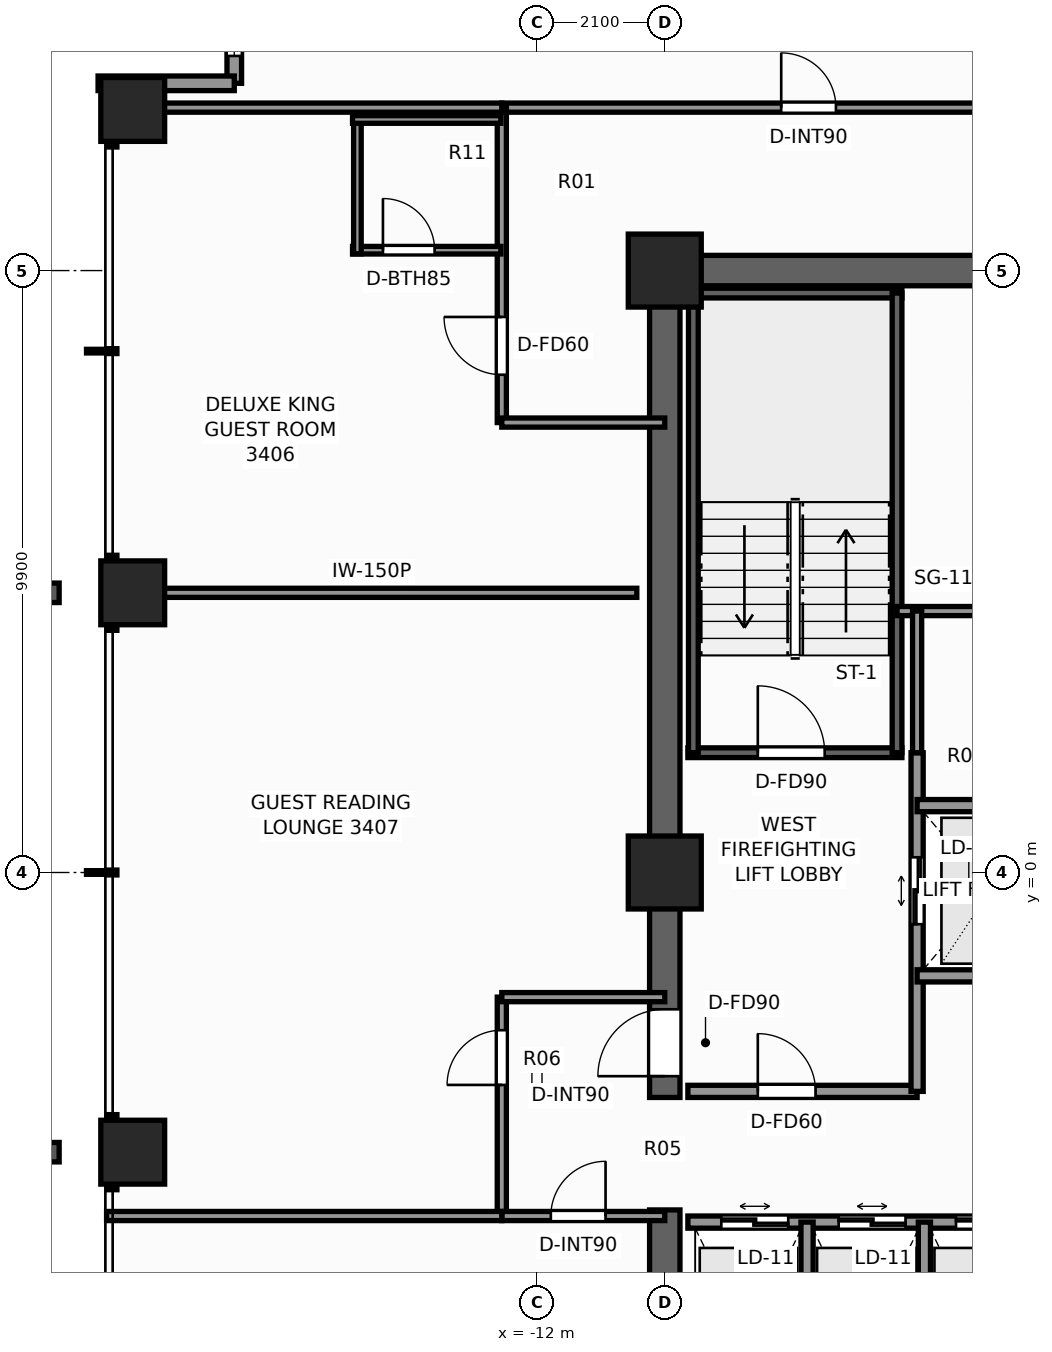
"""IFC4 building model, lengths in metres.
Left out: names, types, materials, properties, quantities, classifications, styles, units other than length and angle.
Written with IfcOpenShell. Run it as: python <this file> out.ifc"""

import sys

from ifc_helpers import new_model, si_unit, direction, frame, frame_2d, origin, origin_2d, place, context, subcontext, project, spatial, rectangle, extrude, element, fill, save


model = new_model("IFC4")
c1 = context("Model", 3, precision=1e-05, world=origin(), true_north=direction((0.0, 1.0)))
c2 = subcontext(c1, "Body", "Model", "MODEL_VIEW")
j1 = project(units=[si_unit("LENGTHUNIT", "METRE"), si_unit("PLANEANGLEUNIT", "RADIAN")], contexts=[c1])
p1 = place(None, origin())
s1 = spatial("IfcSite", under=j1, at=p1, CompositionType="ELEMENT")
p2 = place(p1, origin())
s2 = spatial("IfcBuilding", under=s1, at=p2, CompositionType="ELEMENT")
p3 = place(p2, frame((0.0, 0.0, 118.4)))
s3 = spatial("IfcBuildingStorey", under=s2, at=p3, CompositionType="ELEMENT", Elevation=118.4)
p4 = place(p3, frame((-10.15, 9.9, 0.0), z_axis=(0.0, 0.0, 1.0), x_axis=(1.0, 0.0, 0.0)))
e1 = element("IfcWall", 1, at=p4, inside=s3, PredefinedType="SHEAR", context=c2, shape_type="SweptSolid", body=[
    extrude(rectangle(XDim=14.57, YDim=0.5, at=frame_2d((7.285, 0.0))), origin(), (0.0, 0.0, 1.0), 3.3),
])
p5 = place(p3, frame((-9.9, -9.65, 0.0), z_axis=(0.0, 0.0, 1.0), x_axis=(0.0, 1.0, 0.0)))
e2 = element("IfcWall", 2, at=p5, inside=s3, PredefinedType="SHEAR", context=c2, shape_type="SweptSolid", body=[
    extrude(rectangle(XDim=4.1, YDim=0.5, at=frame_2d((2.05, 0.0))), origin(), (0.0, 0.0, 1.0), 3.3),
])
p6 = place(p3, frame((-9.9, -3.7, 0.0), z_axis=(0.0, 0.0, 1.0), x_axis=(0.0, 1.0, 0.0)))
e3 = element("IfcWall", 3, at=p6, inside=s3, PredefinedType="SHEAR", context=c2, shape_type="SweptSolid", body=[
    extrude(rectangle(XDim=13.35, YDim=0.5, at=frame_2d((6.675, 0.0))), origin(), (0.0, 0.0, 1.0), 3.3),
])
p7 = place(p6, frame((0.35, 0.0, 0.0)))
e4 = element("IfcOpeningElement", 4, at=p7, cuts=e3, PredefinedType="OPENING", context=c2, shape_type="SweptSolid", body=[
    extrude(rectangle(XDim=1.1, YDim=2.2, at=frame_2d((0.55, 1.1))), frame((0.0, 0.26, 0.0), z_axis=(0.0, -1.0, 0.0), x_axis=(1.0, 0.0, 0.0)), (0.0, 0.0, 1.0), 0.52),
])
for number, where, z_axis, x_axis in (
    (5, (-9.9, 9.9, 0.0), (0.0, 0.0, 1.0), (1.0, 0.0, 0.0)),
    (6, (-9.9, 0.0, 0.0), (0.0, 0.0, 1.0), (1.0, 0.0, 0.0)),
):
    element("IfcColumn", number, at=place(p3, frame(where, z_axis=z_axis, x_axis=x_axis)), inside=s3, PredefinedType="COLUMN", context=c2, shape_type="SweptSolid", body=[
        extrude(rectangle(XDim=1.2, YDim=1.2, at=origin_2d()), origin(), (0.0, 0.0, 1.0), 3.3),
    ])
for number, where, z_axis, x_axis in (
    (7, (-18.65, -4.6, 0.0), (0.0, 0.0, 1.0), (1.0, 0.0, 0.0)),
    (8, (-18.65, 4.6, 0.0), (0.0, 0.0, 1.0), (1.0, 0.0, 0.0)),
    (9, (-18.65, 12.55, 0.0), (0.0, 0.0, 1.0), (1.0, 0.0, 0.0)),
):
    element("IfcColumn", number, at=place(p3, frame(where, z_axis=z_axis, x_axis=x_axis)), inside=s3, PredefinedType="COLUMN", context=c2, shape_type="SweptSolid", body=[
        extrude(rectangle(XDim=1.05, YDim=1.05, at=origin_2d()), origin(), (0.0, 0.0, 1.0), 3.3),
    ])
p8 = place(p3, frame((-16.98, 12.98, 0.0), z_axis=(0.0, 0.0, 1.0), x_axis=(0.0, 1.0, 0.0)))
e10 = element("IfcWall", 10, at=p8, inside=s3, PredefinedType="STANDARD", context=c2, shape_type="SweptSolid", body=[
    extrude(rectangle(XDim=2.24, YDim=0.24, at=frame_2d((1.12, 0.0))), origin(), (0.0, 0.0, 1.0), 2.459),
])
p9 = place(p8, frame((0.45, 0.0, 0.65)))
e11 = element("IfcOpeningElement", 11, at=p9, cuts=e10, PredefinedType="OPENING", context=c2, shape_type="SweptSolid", body=[
    extrude(rectangle(XDim=1.1, YDim=1.45, at=frame_2d((0.55, 0.725))), frame((0.0, 0.13, 0.0), z_axis=(0.0, -1.0, 0.0), x_axis=(1.0, 0.0, 0.0)), (0.0, 0.0, 1.0), 0.26),
])
p10 = place(p3, frame((-19.22, 12.98, 0.0), z_axis=(0.0, 0.0, 1.0), x_axis=(1.0, 0.0, 0.0)))
e12 = element("IfcWall", 12, at=p10, inside=s3, PredefinedType="STANDARD", context=c2, shape_type="SweptSolid", body=[
    extrude(rectangle(XDim=2.24, YDim=0.24, at=frame_2d((1.12, 0.0))), origin(), (0.0, 0.0, 1.0), 2.459),
])
p11 = place(p3, frame((-9.52, 1.97, 0.0), z_axis=(0.0, 0.0, 1.0), x_axis=(1.0, 0.0, 0.0)))
e13 = element("IfcWall", 13, at=p11, inside=s3, PredefinedType="SHEAR", context=c2, shape_type="SweptSolid", body=[
    extrude(rectangle(XDim=3.52, YDim=0.16, at=frame_2d((1.76, 0.0))), origin(), (0.0, 0.0, 1.0), 3.3),
])
p12 = place(p11, frame((1.15, 0.0, 0.0)))
e14 = element("IfcOpeningElement", 14, at=p12, cuts=e13, PredefinedType="OPENING", context=c2, shape_type="SweptSolid", body=[
    extrude(rectangle(XDim=1.1, YDim=2.2, at=frame_2d((0.55, 1.1))), frame((0.0, 0.09, 0.0), z_axis=(0.0, -1.0, 0.0), x_axis=(1.0, 0.0, 0.0)), (0.0, 0.0, 1.0), 0.18),
])
p13 = place(p3, frame((-9.52, 9.53, 0.0), z_axis=(0.0, 0.0, 1.0), x_axis=(1.0, 0.0, 0.0)))
e15 = element("IfcWall", 15, at=p13, inside=s3, PredefinedType="SHEAR", context=c2, shape_type="SweptSolid", body=[
    extrude(rectangle(XDim=3.52, YDim=0.16, at=frame_2d((1.76, 0.0))), origin(), (0.0, 0.0, 1.0), 3.3),
])
for number, where, z_axis, x_axis in (
    (16, (-9.43, 1.97, 0.0), (0.0, 0.0, 1.0), (0.0, 1.0, 0.0)),
    (17, (-6.08, 1.97, 0.0), (0.0, 0.0, 1.0), (0.0, 1.0, 0.0)),
):
    element("IfcWall", number, at=place(p3, frame(where, z_axis=z_axis, x_axis=x_axis)), inside=s3, PredefinedType="SHEAR", context=c2, shape_type="SweptSolid", body=[
        extrude(rectangle(XDim=7.56, YDim=0.16, at=frame_2d((3.78, 0.0))), origin(), (0.0, 0.0, 1.0), 3.3),
    ])
p14 = place(p3, frame((-9.52, -3.6, 0.0), z_axis=(0.0, 0.0, 1.0), x_axis=(1.0, 0.0, 0.0)))
e18 = element("IfcWall", 18, at=p14, inside=s3, PredefinedType="SOLIDWALL", context=c2, shape_type="SweptSolid", body=[
    extrude(rectangle(XDim=3.77, YDim=0.2, at=frame_2d((1.885, 0.0))), origin(), (0.0, 0.0, 1.0), 3.08),
])
p15 = place(p14, frame((1.15, 0.0, 0.0)))
e19 = element("IfcOpeningElement", 19, at=p15, cuts=e18, PredefinedType="OPENING", context=c2, shape_type="SweptSolid", body=[
    extrude(rectangle(XDim=0.95, YDim=2.06, at=frame_2d((0.475, 1.03))), frame((0.0, 0.11, 0.0), z_axis=(0.0, -1.0, 0.0), x_axis=(1.0, 0.0, 0.0)), (0.0, 0.0, 1.0), 0.22),
])
p16 = place(p3, frame((-5.75, -3.6, 0.0), z_axis=(0.0, 0.0, 1.0), x_axis=(0.0, 1.0, 0.0)))
e20 = element("IfcWall", 20, at=p16, inside=s3, PredefinedType="SOLIDWALL", context=c2, shape_type="SweptSolid", body=[
    extrude(rectangle(XDim=5.57, YDim=0.2, at=frame_2d((2.785, 0.0))), origin(), (0.0, 0.0, 1.0), 2.715),
])
p17 = place(p16, frame((2.75, 0.0, 0.0)))
e21 = element("IfcOpeningElement", 21, at=p17, cuts=e20, PredefinedType="OPENING", context=c2, shape_type="SweptSolid", body=[
    extrude(rectangle(XDim=1.1, YDim=2.2, at=frame_2d((0.55, 1.1))), frame((0.0, 0.11, 0.0), z_axis=(0.0, -1.0, 0.0), x_axis=(1.0, 0.0, 0.0)), (0.0, 0.0, 1.0), 0.22),
])
for number, where, z_axis, x_axis in (
    (22, (-5.75, -1.7, 0.0), (0.0, 0.0, 1.0), (1.0, 0.0, 0.0)),
    (23, (-5.75, 1.1, 0.0), (0.0, 0.0, 1.0), (1.0, 0.0, 0.0)),
):
    element("IfcWall", number, at=place(p3, frame(where, z_axis=z_axis, x_axis=x_axis)), inside=s3, PredefinedType="SOLIDWALL", context=c2, shape_type="SweptSolid", body=[
        extrude(rectangle(XDim=2.4, YDim=0.2, at=frame_2d((1.2, 0.0))), origin(), (0.0, 0.0, 1.0), 3.08),
    ])
p18 = place(p3, frame((-6.08, 4.3, 0.0), z_axis=(0.0, 0.0, 1.0), x_axis=(1.0, 0.0, 0.0)))
e24 = element("IfcWall", 24, at=p18, inside=s3, PredefinedType="PARTITIONING", context=c2, shape_type="SweptSolid", body=[
    extrude(rectangle(XDim=6.3, YDim=0.15, at=frame_2d((3.15, 0.0))), origin(), (0.0, 0.0, 1.0), 3.08),
])
p19 = place(p3, frame((-9.52, -5.75, 0.0), z_axis=(0.0, 0.0, 1.0), x_axis=(1.0, 0.0, 0.0)))
e25 = element("IfcWall", 25, at=p19, inside=s3, PredefinedType="SOLIDWALL", context=c2, shape_type="SweptSolid", body=[
    extrude(rectangle(XDim=5.66, YDim=0.2, at=frame_2d((2.83, 0.0))), origin(), (0.0, 0.0, 1.0), 3.08),
])
p20 = place(p19, frame((0.55, 0.0, 0.0)))
e26 = element("IfcOpeningElement", 26, at=p20, cuts=e25, PredefinedType="OPENING", context=c2, shape_type="SweptSolid", body=[
    extrude(rectangle(XDim=1.1, YDim=2.2, at=frame_2d((0.55, 1.1))), frame((0.0, 0.11, 0.0), z_axis=(0.0, -1.0, 0.0), x_axis=(1.0, 0.0, 0.0)), (0.0, 0.0, 1.0), 0.22),
])
p21 = place(p19, frame((2.48, 0.0, 0.0)))
e27 = element("IfcOpeningElement", 27, at=p21, cuts=e25, PredefinedType="OPENING", context=c2, shape_type="SweptSolid", body=[
    extrude(rectangle(XDim=1.1, YDim=2.2, at=frame_2d((0.55, 1.1))), frame((0.0, 0.11, 0.0), z_axis=(0.0, -1.0, 0.0), x_axis=(1.0, 0.0, 0.0)), (0.0, 0.0, 1.0), 0.22),
])
p22 = place(p19, frame((4.41, 0.0, 0.0)))
e28 = element("IfcOpeningElement", 28, at=p22, cuts=e25, PredefinedType="OPENING", context=c2, shape_type="SweptSolid", body=[
    extrude(rectangle(XDim=1.1, YDim=2.2, at=frame_2d((0.55, 1.1))), frame((0.0, 0.11, 0.0), z_axis=(0.0, -1.0, 0.0), x_axis=(1.0, 0.0, 0.0)), (0.0, 0.0, 1.0), 0.22),
])
for number, where, z_axis, x_axis in (
    (29, (-7.56, -9.52, 0.0), (0.0, 0.0, 1.0), (0.0, 1.0, 0.0)),
    (30, (-5.63, -9.52, 0.0), (0.0, 0.0, 1.0), (0.0, 1.0, 0.0)),
):
    element("IfcWall", number, at=place(p3, frame(where, z_axis=z_axis, x_axis=x_axis)), inside=s3, PredefinedType="SOLIDWALL", context=c2, shape_type="SweptSolid", body=[
        extrude(rectangle(XDim=3.77, YDim=0.2, at=frame_2d((1.885, 0.0))), origin(), (0.0, 0.0, 1.0), 3.08),
    ])
p23 = place(p3, frame((-5.75, 1.97, 0.0), z_axis=(0.0, 0.0, 1.0), x_axis=(0.0, 1.0, 0.0)))
e31 = element("IfcWall", 31, at=p23, inside=s3, PredefinedType="PARTITIONING", context=c2, shape_type="SweptSolid", body=[
    extrude(rectangle(XDim=2.33, YDim=0.15, at=frame_2d((1.165, 0.0))), origin(), (0.0, 0.0, 1.0), 2.715),
])
p24 = place(p3, frame((-12.58, 12.58, 0.0), z_axis=(0.0, 0.0, 1.0), x_axis=(1.0, 0.0, 0.0)))
e32 = element("IfcWall", 32, at=p24, inside=s3, PredefinedType="PARTITIONING", context=c2, shape_type="SweptSolid", body=[
    extrude(rectangle(XDim=24.84, YDim=0.15, at=frame_2d((12.42, 0.0))), origin(), (0.0, 0.0, 1.0), 2.292),
])
p25 = place(p24, frame((4.595, 0.0, 0.0)))
e33 = element("IfcOpeningElement", 33, at=p25, cuts=e32, PredefinedType="OPENING", context=c2, shape_type="SweptSolid", body=[
    extrude(rectangle(XDim=0.9, YDim=2.06, at=frame_2d((0.45, 1.03))), frame((0.0, 0.085, 0.0), z_axis=(0.0, -1.0, 0.0), x_axis=(1.0, 0.0, 0.0)), (0.0, 0.0, 1.0), 0.17),
])
p26 = place(p24, frame((19.665, 0.0, 0.0)))
e34 = element("IfcOpeningElement", 34, at=p26, cuts=e32, PredefinedType="OPENING", context=c2, shape_type="SweptSolid", body=[
    extrude(rectangle(XDim=0.9, YDim=2.06, at=frame_2d((0.45, 1.03))), frame((0.0, 0.085, 0.0), z_axis=(0.0, -1.0, 0.0), x_axis=(1.0, 0.0, 0.0)), (0.0, 0.0, 1.0), 0.17),
])
p27 = place(p3, frame((-12.58, 7.4, 0.0), z_axis=(0.0, 0.0, 1.0), x_axis=(0.0, 1.0, 0.0)))
e35 = element("IfcWall", 35, at=p27, inside=s3, PredefinedType="PARTITIONING", context=c2, shape_type="SweptSolid", body=[
    extrude(rectangle(XDim=5.18, YDim=0.15, at=frame_2d((2.59, 0.0))), origin(), (0.0, 0.0, 1.0), 2.292),
])
p28 = place(p27, frame((0.787, 0.0, 0.0)))
e36 = element("IfcOpeningElement", 36, at=p28, cuts=e35, PredefinedType="OPENING", context=c2, shape_type="SweptSolid", body=[
    extrude(rectangle(XDim=0.95, YDim=2.06, at=frame_2d((0.475, 1.03))), frame((0.0, 0.085, 0.0), z_axis=(0.0, -1.0, 0.0), x_axis=(1.0, 0.0, 0.0)), (0.0, 0.0, 1.0), 0.17),
])
p29 = place(p3, frame((-12.58, 7.4, 0.0), z_axis=(0.0, 0.0, 1.0), x_axis=(1.0, 0.0, 0.0)))
e37 = element("IfcWall", 37, at=p29, inside=s3, PredefinedType="PARTITIONING", context=c2, shape_type="SweptSolid", body=[
    extrude(rectangle(XDim=2.68, YDim=0.15, at=frame_2d((1.34, 0.0))), origin(), (0.0, 0.0, 1.0), 3.08),
])
p30 = place(p3, frame((-12.58, -5.65, 0.0), z_axis=(0.0, 0.0, 1.0), x_axis=(0.0, 1.0, 0.0)))
e38 = element("IfcWall", 38, at=p30, inside=s3, PredefinedType="PARTITIONING", context=c2, shape_type="SweptSolid", body=[
    extrude(rectangle(XDim=3.6, YDim=0.15, at=frame_2d((1.8, 0.0))), origin(), (0.0, 0.0, 1.0), 2.292),
])
p31 = place(p30, frame((2.156, 0.0, 0.0)))
e39 = element("IfcOpeningElement", 39, at=p31, cuts=e38, PredefinedType="OPENING", context=c2, shape_type="SweptSolid", body=[
    extrude(rectangle(XDim=0.9, YDim=2.06, at=frame_2d((0.45, 1.03))), frame((0.0, 0.085, 0.0), z_axis=(0.0, -1.0, 0.0), x_axis=(1.0, 0.0, 0.0)), (0.0, 0.0, 1.0), 0.17),
])
p32 = place(p3, frame((-12.58, -2.05, 0.0), z_axis=(0.0, 0.0, 1.0), x_axis=(1.0, 0.0, 0.0)))
e40 = element("IfcWall", 40, at=p32, inside=s3, PredefinedType="PARTITIONING", context=c2, shape_type="SweptSolid", body=[
    extrude(rectangle(XDim=2.68, YDim=0.15, at=frame_2d((1.34, 0.0))), origin(), (0.0, 0.0, 1.0), 3.08),
])
p33 = place(p3, frame((-12.58, -5.65, 0.0), z_axis=(0.0, 0.0, 1.0), x_axis=(1.0, 0.0, 0.0)))
e41 = element("IfcWall", 41, at=p33, inside=s3, PredefinedType="PARTITIONING", context=c2, shape_type="SweptSolid", body=[
    extrude(rectangle(XDim=2.68, YDim=0.15, at=frame_2d((1.34, 0.0))), origin(), (0.0, 0.0, 1.0), 3.08),
])
p34 = place(p33, frame((0.806, 0.0, 0.0)))
e42 = element("IfcOpeningElement", 42, at=p34, cuts=e41, PredefinedType="OPENING", context=c2, shape_type="SweptSolid", body=[
    extrude(rectangle(XDim=0.9, YDim=2.06, at=frame_2d((0.45, 1.03))), frame((0.0, 0.085, 0.0), z_axis=(0.0, -1.0, 0.0), x_axis=(1.0, 0.0, 0.0)), (0.0, 0.0, 1.0), 0.17),
])
p35 = place(p3, frame((-19.08, 12.58, 0.0), z_axis=(0.0, 0.0, 1.0), x_axis=(1.0, 0.0, 0.0)))
e43 = element("IfcWall", 43, at=p35, inside=s3, PredefinedType="PARTITIONING", context=c2, shape_type="SweptSolid", body=[
    extrude(rectangle(XDim=6.5, YDim=0.15, at=frame_2d((3.25, 0.0))), origin(), (0.0, 0.0, 1.0), 2.292),
])
p36 = place(p3, frame((-19.08, 4.6, 0.0), z_axis=(0.0, 0.0, 1.0), x_axis=(1.0, 0.0, 0.0)))
e44 = element("IfcWall", 44, at=p36, inside=s3, PredefinedType="PARTITIONING", context=c2, shape_type="SweptSolid", body=[
    extrude(rectangle(XDim=8.72, YDim=0.15, at=frame_2d((4.36, 0.0))), origin(), (0.0, 0.0, 1.0), 2.292),
])
p37 = place(p3, frame((-19.08, -5.65, 0.0), z_axis=(0.0, 0.0, 1.0), x_axis=(1.0, 0.0, 0.0)))
e45 = element("IfcWall", 45, at=p37, inside=s3, PredefinedType="PARTITIONING", context=c2, shape_type="SweptSolid", body=[
    extrude(rectangle(XDim=6.5, YDim=0.15, at=frame_2d((3.25, 0.0))), origin(), (0.0, 0.0, 1.0), 2.449),
])
p38 = place(p3, frame((-15.035, 10.235, 0.0), z_axis=(0.0, 0.0, 1.0), x_axis=(1.0, 0.0, 0.0)))
e46 = element("IfcWall", 46, at=p38, inside=s3, PredefinedType="PARTITIONING", context=c2, shape_type="SweptSolid", body=[
    extrude(rectangle(XDim=2.44, YDim=0.125, at=frame_2d((1.22, 0.0))), origin(), (0.0, 0.0, 1.0), 3.08),
])
p39 = place(p38, frame((0.5, 0.0, 0.0)))
e47 = element("IfcOpeningElement", 47, at=p39, cuts=e46, PredefinedType="OPENING", context=c2, shape_type="SweptSolid", body=[
    extrude(rectangle(XDim=0.85, YDim=2.03, at=frame_2d((0.425, 1.015))), frame((0.0, 0.073, 0.0), z_axis=(0.0, -1.0, 0.0), x_axis=(1.0, 0.0, 0.0)), (0.0, 0.0, 1.0), 0.145),
])
p40 = place(p3, frame((-14.955, 10.175, 0.0), z_axis=(0.0, 0.0, 1.0), x_axis=(0.0, 1.0, 0.0)))
e48 = element("IfcWall", 48, at=p40, inside=s3, PredefinedType="PARTITIONING", context=c2, shape_type="SweptSolid", body=[
    extrude(rectangle(XDim=2.27, YDim=0.125, at=frame_2d((1.135, 0.0))), origin(), (0.0, 0.0, 1.0), 2.292),
])
p41 = place(p3, frame((-15.035, 12.385, 0.0), z_axis=(0.0, 0.0, 1.0), x_axis=(1.0, 0.0, 0.0)))
e49 = element("IfcWall", 49, at=p41, inside=s3, PredefinedType="PARTITIONING", context=c2, shape_type="SweptSolid", body=[
    extrude(rectangle(XDim=2.44, YDim=0.125, at=frame_2d((1.22, 0.0))), origin(), (0.0, 0.0, 1.0), 3.08),
])
p42 = place(p9, origin())
e50 = element("IfcWindow", 50, at=p42, inside=s3, PartitioningType="SINGLE_PANEL", PredefinedType="WINDOW", context=c2, shape_type="SweptSolid", body=[
    extrude(rectangle(XDim=1.1, YDim=1.45, at=frame_2d((0.55, 0.725))), frame((0.0, 0.03, 0.0), z_axis=(0.0, -1.0, 0.0), x_axis=(1.0, 0.0, 0.0)), (0.0, 0.0, 1.0), 0.06),
])
fill(e11, e50)
p43 = place(p12, origin())
e51 = element("IfcDoor", 51, at=p43, inside=s3, OperationType="SINGLE_SWING_LEFT", PredefinedType="DOOR", context=c2, shape_type="SweptSolid", body=[
    extrude(rectangle(XDim=1.1, YDim=2.2, at=frame_2d((0.55, 1.1))), frame((0.0, 0.025, 0.0), z_axis=(0.0, -1.0, 0.0), x_axis=(1.0, 0.0, 0.0)), (0.0, 0.0, 1.0), 0.05),
])
fill(e14, e51)
p44 = place(p7, origin())
e52 = element("IfcDoor", 52, at=p44, inside=s3, OperationType="SINGLE_SWING_LEFT", PredefinedType="DOOR", context=c2, shape_type="SweptSolid", body=[
    extrude(rectangle(XDim=1.1, YDim=2.2, at=frame_2d((0.55, 1.1))), frame((0.0, 0.025, 0.0), z_axis=(0.0, -1.0, 0.0), x_axis=(1.0, 0.0, 0.0)), (0.0, 0.0, 1.0), 0.05),
])
fill(e4, e52)
p45 = place(p17, origin())
e53 = element("IfcDoor", 53, at=p45, inside=s3, OperationType="DOUBLE_DOOR_SLIDING", PredefinedType="DOOR", context=c2, shape_type="SweptSolid", body=[
    extrude(rectangle(XDim=1.1, YDim=2.2, at=frame_2d((0.55, 1.1))), frame((0.0, 0.025, 0.0), z_axis=(0.0, -1.0, 0.0), x_axis=(1.0, 0.0, 0.0)), (0.0, 0.0, 1.0), 0.05),
])
fill(e21, e53)
p46 = place(p20, origin())
e54 = element("IfcDoor", 54, at=p46, inside=s3, OperationType="DOUBLE_DOOR_SLIDING", PredefinedType="DOOR", context=c2, shape_type="SweptSolid", body=[
    extrude(rectangle(XDim=1.1, YDim=2.2, at=frame_2d((0.55, 1.1))), frame((0.0, 0.025, 0.0), z_axis=(0.0, -1.0, 0.0), x_axis=(1.0, 0.0, 0.0)), (0.0, 0.0, 1.0), 0.05),
])
fill(e26, e54)
p47 = place(p21, origin())
e55 = element("IfcDoor", 55, at=p47, inside=s3, OperationType="DOUBLE_DOOR_SLIDING", PredefinedType="DOOR", context=c2, shape_type="SweptSolid", body=[
    extrude(rectangle(XDim=1.1, YDim=2.2, at=frame_2d((0.55, 1.1))), frame((0.0, 0.025, 0.0), z_axis=(0.0, -1.0, 0.0), x_axis=(1.0, 0.0, 0.0)), (0.0, 0.0, 1.0), 0.05),
])
fill(e27, e55)
p48 = place(p22, origin())
e56 = element("IfcDoor", 56, at=p48, inside=s3, OperationType="DOUBLE_DOOR_SLIDING", PredefinedType="DOOR", context=c2, shape_type="SweptSolid", body=[
    extrude(rectangle(XDim=1.1, YDim=2.2, at=frame_2d((0.55, 1.1))), frame((0.0, 0.025, 0.0), z_axis=(0.0, -1.0, 0.0), x_axis=(1.0, 0.0, 0.0)), (0.0, 0.0, 1.0), 0.05),
])
fill(e28, e56)
p49 = place(p15, origin())
e57 = element("IfcDoor", 57, at=p49, inside=s3, OperationType="SINGLE_SWING_LEFT", PredefinedType="DOOR", context=c2, shape_type="SweptSolid", body=[
    extrude(rectangle(XDim=0.95, YDim=2.06, at=frame_2d((0.475, 1.03))), frame((0.0, 0.025, 0.0), z_axis=(0.0, -1.0, 0.0), x_axis=(1.0, 0.0, 0.0)), (0.0, 0.0, 1.0), 0.05),
])
fill(e19, e57)
p50 = place(p25, origin())
e58 = element("IfcDoor", 58, at=p50, inside=s3, OperationType="SINGLE_SWING_LEFT", PredefinedType="DOOR", context=c2, shape_type="SweptSolid", body=[
    extrude(rectangle(XDim=0.9, YDim=2.06, at=frame_2d((0.45, 1.03))), frame((0.0, 0.025, 0.0), z_axis=(0.0, -1.0, 0.0), x_axis=(1.0, 0.0, 0.0)), (0.0, 0.0, 1.0), 0.05),
])
fill(e33, e58)
p51 = place(p39, origin())
e59 = element("IfcDoor", 59, at=p51, inside=s3, OperationType="SINGLE_SWING_LEFT", PredefinedType="DOOR", context=c2, shape_type="SweptSolid", body=[
    extrude(rectangle(XDim=0.85, YDim=2.03, at=frame_2d((0.425, 1.015))), frame((0.0, 0.025, 0.0), z_axis=(0.0, -1.0, 0.0), x_axis=(1.0, 0.0, 0.0)), (0.0, 0.0, 1.0), 0.05),
])
fill(e47, e59)
p52 = place(p28, origin())
e60 = element("IfcDoor", 60, at=p52, inside=s3, OperationType="SINGLE_SWING_RIGHT", PredefinedType="DOOR", context=c2, shape_type="SweptSolid", body=[
    extrude(rectangle(XDim=0.95, YDim=2.06, at=frame_2d((0.475, 1.03))), frame((0.0, 0.025, 0.0), z_axis=(0.0, -1.0, 0.0), x_axis=(1.0, 0.0, 0.0)), (0.0, 0.0, 1.0), 0.05),
])
fill(e36, e60)
p53 = place(p31, origin())
e61 = element("IfcDoor", 61, at=p53, inside=s3, OperationType="SINGLE_SWING_LEFT", PredefinedType="DOOR", context=c2, shape_type="SweptSolid", body=[
    extrude(rectangle(XDim=0.9, YDim=2.06, at=frame_2d((0.45, 1.03))), frame((0.0, 0.025, 0.0), z_axis=(0.0, -1.0, 0.0), x_axis=(1.0, 0.0, 0.0)), (0.0, 0.0, 1.0), 0.05),
])
fill(e39, e61)
p54 = place(p34, origin())
e62 = element("IfcDoor", 62, at=p54, inside=s3, OperationType="SINGLE_SWING_RIGHT", PredefinedType="DOOR", context=c2, shape_type="SweptSolid", body=[
    extrude(rectangle(XDim=0.9, YDim=2.06, at=frame_2d((0.45, 1.03))), frame((0.0, 0.025, 0.0), z_axis=(0.0, -1.0, 0.0), x_axis=(1.0, 0.0, 0.0)), (0.0, 0.0, 1.0), 0.05),
])
fill(e42, e62)
save(model, sys.argv[1])
